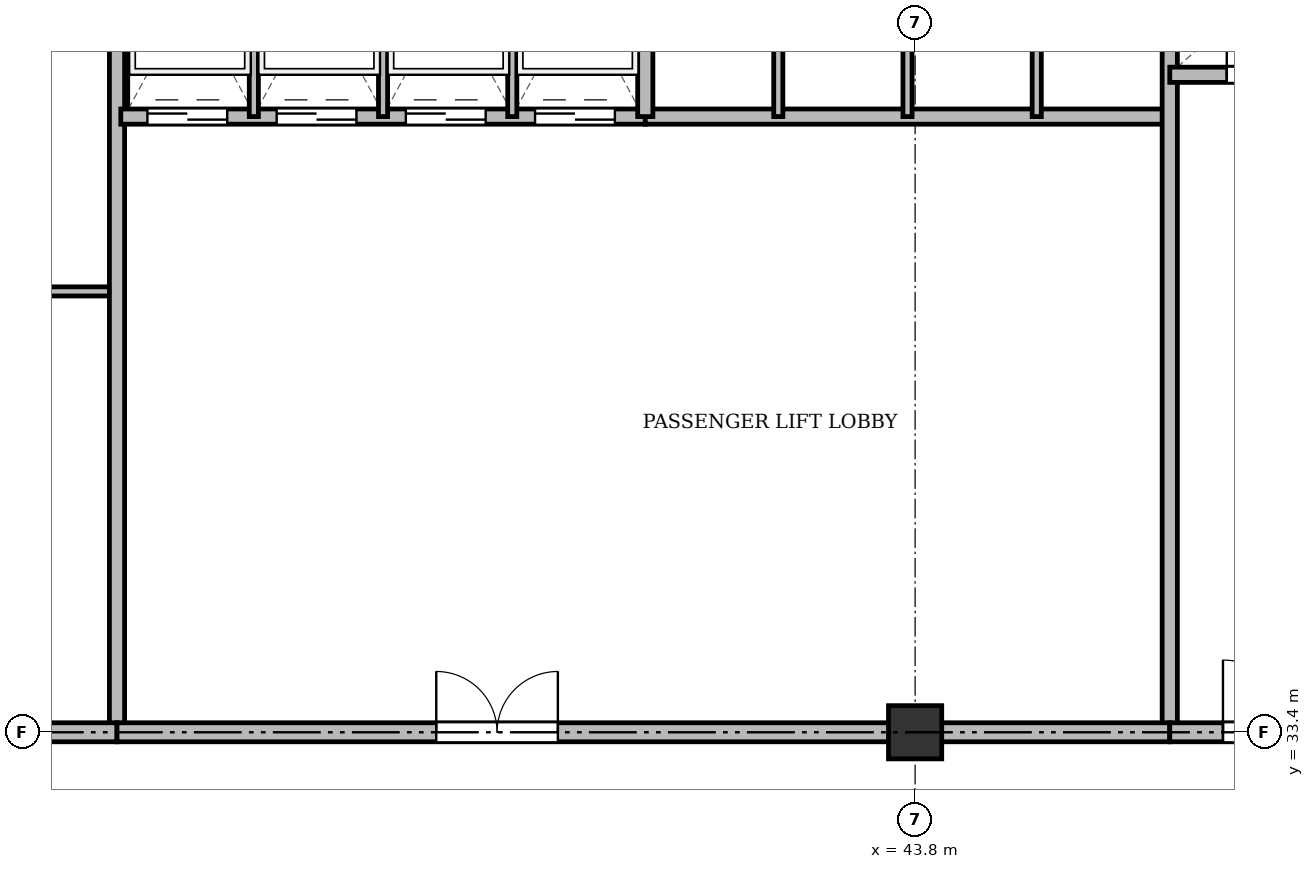
"""IFC4 building model, lengths in metres.
Left out: names, types, materials, properties, quantities, classifications, styles, units other than length and angle.
Written with IfcOpenShell. Run it as: python <this file> out.ifc"""

import sys

from ifc_helpers import new_model, si_unit, direction, frame, frame_2d, origin, origin_2d, place, context, subcontext, project, spatial, rectangle, extrude, source, transform, mapped, element, fill, save


model = new_model("IFC4")
c1 = context("Model", 3, precision=1e-05, world=origin(), true_north=direction((0.0, 1.0)))
c2 = subcontext(c1, "Body", "Model", "MODEL_VIEW")
j1 = project(units=[si_unit("LENGTHUNIT", "METRE"), si_unit("PLANEANGLEUNIT", "RADIAN")], contexts=[c1])
p1 = place(None, origin())
s1 = spatial("IfcSite", under=j1, at=p1, CompositionType="ELEMENT")
p2 = place(p1, origin())
s2 = spatial("IfcBuilding", under=s1, at=p2, CompositionType="ELEMENT")
p3 = place(p2, frame((0.0, 0.0, 146.5)))
s3 = spatial("IfcBuildingStorey", under=s2, at=p3, CompositionType="ELEMENT", Elevation=146.5)
m1 = source(origin(), c2, "Body", "SweptSolid", [
    extrude(rectangle(XDim=0.7, YDim=0.7, at=origin_2d()), origin(), (0.0, 0.0, 1.0), 3.6),
])
p4 = place(p3, frame((43.8, 33.4, 0.0), z_axis=(0.0, 0.0, 1.0), x_axis=(1.0, 0.0, 0.0)))
e1 = element("IfcColumn", 1, at=p4, inside=s3, PredefinedType="COLUMN", context=c2, shape_type="MappedRepresentation", body=[
    mapped(m1, transform((0.0, 0.0, 0.0), x_axis=(1.0, 0.0, 0.0), y_axis=(0.0, 1.0, 0.0), z_axis=(0.0, 0.0, 1.0), scale=1.0)),
])
p5 = place(p3, frame((26.3, 39.2, 0.0), z_axis=(0.0, 0.0, 1.0), x_axis=(1.0, 0.0, 0.0)))
e2 = element("IfcWall", 2, at=p5, inside=s3, PredefinedType="PARTITIONING", context=c2, shape_type="SweptSolid", body=[
    extrude(rectangle(XDim=7.0, YDim=0.12, at=frame_2d((3.5, 0.0))), origin(), (0.0, 0.0, 1.0), 2.85),
])
p6 = place(p5, frame((2.6, 0.0, 0.0)))
e3 = element("IfcOpeningElement", 3, at=p6, cuts=e2, PredefinedType="OPENING", context=c2, shape_type="SweptSolid", body=[
    extrude(rectangle(XDim=0.95, YDim=2.15, at=frame_2d((0.475, 1.075))), frame((0.0, 0.07, 0.0), z_axis=(0.0, -1.0, 0.0), x_axis=(1.0, 0.0, 0.0)), (0.0, 0.0, 1.0), 0.14),
])
p7 = place(p3, frame((33.3, 33.4, 0.0), z_axis=(0.0, 0.0, 1.0), x_axis=(0.0, 1.0, 0.0)))
e4 = element("IfcWall", 4, at=p7, inside=s3, PredefinedType="SOLIDWALL", context=c2, shape_type="SweptSolid", body=[
    extrude(rectangle(XDim=11.3, YDim=0.2, at=frame_2d((5.65, 0.0))), origin(), (0.0, 0.0, 1.0), 2.75),
])
p8 = place(p3, frame((33.35, 41.5, 0.0), z_axis=(0.0, 0.0, 1.0), x_axis=(1.0, 0.0, 0.0)))
e5 = element("IfcWall", 5, at=p8, inside=s3, PredefinedType="SOLIDWALL", context=c2, shape_type="SweptSolid", body=[
    extrude(rectangle(XDim=6.9, YDim=0.2, at=frame_2d((3.45, 0.0))), origin(), (0.0, 0.0, 1.0), 3.35),
])
p9 = place(p8, frame((0.35, 0.0, 0.0)))
e6 = element("IfcOpeningElement", 6, at=p9, cuts=e5, PredefinedType="OPENING", context=c2, shape_type="SweptSolid", body=[
    extrude(rectangle(XDim=1.05, YDim=2.15, at=frame_2d((0.525, 1.075))), frame((0.0, 0.11, 0.0), z_axis=(0.0, -1.0, 0.0), x_axis=(1.0, 0.0, 0.0)), (0.0, 0.0, 1.0), 0.22),
])
p10 = place(p8, frame((2.05, 0.0, 0.0)))
e7 = element("IfcOpeningElement", 7, at=p10, cuts=e5, PredefinedType="OPENING", context=c2, shape_type="SweptSolid", body=[
    extrude(rectangle(XDim=1.05, YDim=2.15, at=frame_2d((0.525, 1.075))), frame((0.0, 0.11, 0.0), z_axis=(0.0, -1.0, 0.0), x_axis=(1.0, 0.0, 0.0)), (0.0, 0.0, 1.0), 0.22),
])
p11 = place(p8, frame((3.75, 0.0, 0.0)))
e8 = element("IfcOpeningElement", 8, at=p11, cuts=e5, PredefinedType="OPENING", context=c2, shape_type="SweptSolid", body=[
    extrude(rectangle(XDim=1.05, YDim=2.15, at=frame_2d((0.525, 1.075))), frame((0.0, 0.11, 0.0), z_axis=(0.0, -1.0, 0.0), x_axis=(1.0, 0.0, 0.0)), (0.0, 0.0, 1.0), 0.22),
])
p12 = place(p8, frame((5.45, 0.0, 0.0)))
e9 = element("IfcOpeningElement", 9, at=p12, cuts=e5, PredefinedType="OPENING", context=c2, shape_type="SweptSolid", body=[
    extrude(rectangle(XDim=1.05, YDim=2.15, at=frame_2d((0.525, 1.075))), frame((0.0, 0.11, 0.0), z_axis=(0.0, -1.0, 0.0), x_axis=(1.0, 0.0, 0.0)), (0.0, 0.0, 1.0), 0.22),
])
for number, where, z_axis, x_axis in (
    (10, (35.1, 41.5, 0.0), (0.0, 0.0, 1.0), (0.0, 1.0, 0.0)),
    (11, (36.8, 41.5, 0.0), (0.0, 0.0, 1.0), (0.0, 1.0, 0.0)),
    (12, (38.5, 41.5, 0.0), (0.0, 0.0, 1.0), (0.0, 1.0, 0.0)),
):
    element("IfcWall", number, at=place(p3, frame(where, z_axis=z_axis, x_axis=x_axis)), inside=s3, PredefinedType="PARTITIONING", context=c2, shape_type="SweptSolid", body=[
        extrude(rectangle(XDim=3.2, YDim=0.12, at=frame_2d((1.6, 0.0))), origin(), (0.0, 0.0, 1.0), 3.35),
    ])
p13 = place(p3, frame((40.25, 41.5, 0.0), z_axis=(0.0, 0.0, 1.0), x_axis=(1.0, 0.0, 0.0)))
e13 = element("IfcWall", 13, at=p13, inside=s3, PredefinedType="SOLIDWALL", context=c2, shape_type="SweptSolid", body=[
    extrude(rectangle(XDim=6.9, YDim=0.2, at=frame_2d((3.45, 0.0))), origin(), (0.0, 0.0, 1.0), 2.85),
])
p14 = place(p3, frame((40.25, 41.5, 0.0), z_axis=(0.0, 0.0, 1.0), x_axis=(0.0, 1.0, 0.0)))
e14 = element("IfcWall", 14, at=p14, inside=s3, PredefinedType="SOLIDWALL", context=c2, shape_type="SweptSolid", body=[
    extrude(rectangle(XDim=3.2, YDim=0.2, at=frame_2d((1.6, 0.0))), origin(), (0.0, 0.0, 1.0), 3.35),
])
p15 = place(p3, frame((42.0, 41.5, 0.0), z_axis=(0.0, 0.0, 1.0), x_axis=(0.0, 1.0, 0.0)))
e15 = element("IfcWall", 15, at=p15, inside=s3, PredefinedType="PARTITIONING", context=c2, shape_type="SweptSolid", body=[
    extrude(rectangle(XDim=3.2, YDim=0.12, at=frame_2d((1.6, 0.0))), origin(), (0.0, 0.0, 1.0), 3.35),
])
p16 = place(p3, frame((43.7, 41.5, 0.0), z_axis=(0.0, 0.0, 1.0), x_axis=(0.0, 1.0, 0.0)))
e16 = element("IfcWall", 16, at=p16, inside=s3, PredefinedType="PARTITIONING", context=c2, shape_type="SweptSolid", body=[
    extrude(rectangle(XDim=3.2, YDim=0.12, at=frame_2d((1.6, 0.0))), origin(), (0.0, 0.0, 1.0), 2.85),
])
p17 = place(p3, frame((45.4, 41.5, 0.0), z_axis=(0.0, 0.0, 1.0), x_axis=(0.0, 1.0, 0.0)))
e17 = element("IfcWall", 17, at=p17, inside=s3, PredefinedType="PARTITIONING", context=c2, shape_type="SweptSolid", body=[
    extrude(rectangle(XDim=3.2, YDim=0.12, at=frame_2d((1.6, 0.0))), origin(), (0.0, 0.0, 1.0), 3.35),
])
p18 = place(p3, frame((47.15, 33.4, 0.0), z_axis=(0.0, 0.0, 1.0), x_axis=(0.0, 1.0, 0.0)))
e18 = element("IfcWall", 18, at=p18, inside=s3, PredefinedType="SOLIDWALL", context=c2, shape_type="SweptSolid", body=[
    extrude(rectangle(XDim=11.3, YDim=0.2, at=frame_2d((5.65, 0.0))), origin(), (0.0, 0.0, 1.0), 2.75),
])
p19 = place(p3, frame((26.3, 33.4, 0.0), z_axis=(0.0, 0.0, 1.0), x_axis=(1.0, 0.0, 0.0)))
e19 = element("IfcWall", 19, at=p19, inside=s3, PredefinedType="PARTITIONING", context=c2, shape_type="SweptSolid", body=[
    extrude(rectangle(XDim=7.0, YDim=0.25, at=frame_2d((3.5, 0.0))), origin(), (0.0, 0.0, 1.0), 2.75),
])
p20 = place(p19, frame((1.35, 0.0, 0.0)))
e20 = element("IfcOpeningElement", 20, at=p20, cuts=e19, PredefinedType="OPENING", context=c2, shape_type="SweptSolid", body=[
    extrude(rectangle(XDim=0.95, YDim=2.15, at=frame_2d((0.475, 1.075))), frame((0.0, 0.135, 0.0), z_axis=(0.0, -1.0, 0.0), x_axis=(1.0, 0.0, 0.0)), (0.0, 0.0, 1.0), 0.27),
])
p21 = place(p3, frame((33.3, 33.4, 0.0), z_axis=(0.0, 0.0, 1.0), x_axis=(1.0, 0.0, 0.0)))
e21 = element("IfcWall", 21, at=p21, inside=s3, PredefinedType="PARTITIONING", context=c2, shape_type="SweptSolid", body=[
    extrude(rectangle(XDim=13.85, YDim=0.25, at=frame_2d((6.925, 0.0))), origin(), (0.0, 0.0, 1.0), 2.75),
])
p22 = place(p21, frame((4.2, 0.0, 0.0)))
e22 = element("IfcOpeningElement", 22, at=p22, cuts=e21, PredefinedType="OPENING", context=c2, shape_type="SweptSolid", body=[
    extrude(rectangle(XDim=1.6, YDim=2.2, at=frame_2d((0.8, 1.1))), frame((0.0, 0.135, 0.0), z_axis=(0.0, -1.0, 0.0), x_axis=(1.0, 0.0, 0.0)), (0.0, 0.0, 1.0), 0.27),
])
p23 = place(p3, frame((47.15, 42.05, 0.0), z_axis=(0.0, 0.0, 1.0), x_axis=(1.0, 0.0, 0.0)))
e23 = element("IfcWall", 23, at=p23, inside=s3, PredefinedType="SOLIDWALL", context=c2, shape_type="SweptSolid", body=[
    extrude(rectangle(XDim=7.85, YDim=0.2, at=frame_2d((3.925, 0.0))), origin(), (0.0, 0.0, 1.0), 2.85),
])
p24 = place(p23, frame((0.75, 0.0, 0.0)))
e24 = element("IfcOpeningElement", 24, at=p24, cuts=e23, PredefinedType="OPENING", context=c2, shape_type="SweptSolid", body=[
    extrude(rectangle(XDim=0.9, YDim=2.1, at=frame_2d((0.45, 1.05))), frame((0.0, 0.11, 0.0), z_axis=(0.0, -1.0, 0.0), x_axis=(1.0, 0.0, 0.0)), (0.0, 0.0, 1.0), 0.22),
])
p25 = place(p23, frame((3.85, 0.0, 0.0)))
e25 = element("IfcOpeningElement", 25, at=p25, cuts=e23, PredefinedType="OPENING", context=c2, shape_type="SweptSolid", body=[
    extrude(rectangle(XDim=0.9, YDim=2.1, at=frame_2d((0.45, 1.05))), frame((0.0, 0.11, 0.0), z_axis=(0.0, -1.0, 0.0), x_axis=(1.0, 0.0, 0.0)), (0.0, 0.0, 1.0), 0.22),
])
p26 = place(p3, frame((47.15, 33.4, 0.0), z_axis=(0.0, 0.0, 1.0), x_axis=(1.0, 0.0, 0.0)))
e26 = element("IfcWall", 26, at=p26, inside=s3, PredefinedType="PARTITIONING", context=c2, shape_type="SweptSolid", body=[
    extrude(rectangle(XDim=11.15, YDim=0.25, at=frame_2d((5.575, 0.0))), origin(), (0.0, 0.0, 1.0), 2.75),
])
p27 = place(p26, frame((0.7, 0.0, 0.0)))
e27 = element("IfcOpeningElement", 27, at=p27, cuts=e26, PredefinedType="OPENING", context=c2, shape_type="SweptSolid", body=[
    extrude(rectangle(XDim=0.95, YDim=2.15, at=frame_2d((0.475, 1.075))), frame((0.0, 0.135, 0.0), z_axis=(0.0, -1.0, 0.0), x_axis=(1.0, 0.0, 0.0)), (0.0, 0.0, 1.0), 0.27),
])
p28 = place(p26, frame((6.0, 0.0, 0.0)))
e28 = element("IfcOpeningElement", 28, at=p28, cuts=e26, PredefinedType="OPENING", context=c2, shape_type="SweptSolid", body=[
    extrude(rectangle(XDim=1.2, YDim=2.15, at=frame_2d((0.6, 1.075))), frame((0.0, 0.135, 0.0), z_axis=(0.0, -1.0, 0.0), x_axis=(1.0, 0.0, 0.0)), (0.0, 0.0, 1.0), 0.27),
])
m2 = source(origin(), c2, "Body", "SweptSolid", [
    extrude(rectangle(XDim=1.05, YDim=2.15, at=frame_2d((0.525, 1.075))), frame((0.0, 0.025, 0.0), z_axis=(0.0, -1.0, 0.0), x_axis=(1.0, 0.0, 0.0)), (0.0, 0.0, 1.0), 0.05),
])
p29 = place(p9, origin())
e29 = element("IfcDoor", 29, at=p29, inside=s3, OperationType="DOUBLE_DOOR_SLIDING", PredefinedType="DOOR", context=c2, shape_type="MappedRepresentation", body=[
    mapped(m2, transform((0.0, 0.0, 0.0), x_axis=(1.0, 0.0, 0.0), y_axis=(0.0, 1.0, 0.0), z_axis=(0.0, 0.0, 1.0), scale=1.0)),
])
fill(e6, e29)
p30 = place(p10, origin())
e30 = element("IfcDoor", 30, at=p30, inside=s3, OperationType="DOUBLE_DOOR_SLIDING", PredefinedType="DOOR", context=c2, shape_type="MappedRepresentation", body=[
    mapped(m2, transform((0.0, 0.0, 0.0), x_axis=(1.0, 0.0, 0.0), y_axis=(0.0, 1.0, 0.0), z_axis=(0.0, 0.0, 1.0), scale=1.0)),
])
fill(e7, e30)
p31 = place(p11, origin())
e31 = element("IfcDoor", 31, at=p31, inside=s3, OperationType="DOUBLE_DOOR_SLIDING", PredefinedType="DOOR", context=c2, shape_type="MappedRepresentation", body=[
    mapped(m2, transform((0.0, 0.0, 0.0), x_axis=(1.0, 0.0, 0.0), y_axis=(0.0, 1.0, 0.0), z_axis=(0.0, 0.0, 1.0), scale=1.0)),
])
fill(e8, e31)
p32 = place(p12, origin())
e32 = element("IfcDoor", 32, at=p32, inside=s3, OperationType="DOUBLE_DOOR_SLIDING", PredefinedType="DOOR", context=c2, shape_type="MappedRepresentation", body=[
    mapped(m2, transform((0.0, 0.0, 0.0), x_axis=(1.0, 0.0, 0.0), y_axis=(0.0, 1.0, 0.0), z_axis=(0.0, 0.0, 1.0), scale=1.0)),
])
fill(e9, e32)
m3 = source(origin(), c2, "Body", "SweptSolid", [
    extrude(rectangle(XDim=1.6, YDim=2.2, at=frame_2d((0.8, 1.1))), frame((0.0, 0.025, 0.0), z_axis=(0.0, -1.0, 0.0), x_axis=(1.0, 0.0, 0.0)), (0.0, 0.0, 1.0), 0.05),
])
p33 = place(p22, origin())
e33 = element("IfcDoor", 33, at=p33, inside=s3, OperationType="DOUBLE_DOOR_SINGLE_SWING", PredefinedType="DOOR", context=c2, shape_type="MappedRepresentation", body=[
    mapped(m3, transform((0.0, 0.0, 0.0), x_axis=(1.0, 0.0, 0.0), y_axis=(0.0, 1.0, 0.0), z_axis=(0.0, 0.0, 1.0), scale=1.0)),
])
fill(e22, e33)
m4 = source(origin(), c2, "Body", "SweptSolid", [
    extrude(rectangle(XDim=0.9, YDim=2.1, at=frame_2d((0.45, 1.05))), frame((0.0, 0.025, 0.0), z_axis=(0.0, -1.0, 0.0), x_axis=(1.0, 0.0, 0.0)), (0.0, 0.0, 1.0), 0.05),
])
p34 = place(p24, origin())
e34 = element("IfcDoor", 34, at=p34, inside=s3, OperationType="SINGLE_SWING_LEFT", PredefinedType="DOOR", context=c2, shape_type="MappedRepresentation", body=[
    mapped(m4, transform((0.0, 0.0, 0.0), x_axis=(1.0, 0.0, 0.0), y_axis=(0.0, 1.0, 0.0), z_axis=(0.0, 0.0, 1.0), scale=1.0)),
])
fill(e24, e34)
m5 = source(origin(), c2, "Body", "SweptSolid", [
    extrude(rectangle(XDim=0.95, YDim=2.15, at=frame_2d((0.475, 1.075))), frame((0.0, 0.025, 0.0), z_axis=(0.0, -1.0, 0.0), x_axis=(1.0, 0.0, 0.0)), (0.0, 0.0, 1.0), 0.05),
])
p35 = place(p27, origin())
e35 = element("IfcDoor", 35, at=p35, inside=s3, OperationType="SINGLE_SWING_LEFT", PredefinedType="DOOR", context=c2, shape_type="MappedRepresentation", body=[
    mapped(m5, transform((0.0, 0.0, 0.0), x_axis=(1.0, 0.0, 0.0), y_axis=(0.0, 1.0, 0.0), z_axis=(0.0, 0.0, 1.0), scale=1.0)),
])
fill(e27, e35)
save(model, sys.argv[1])
